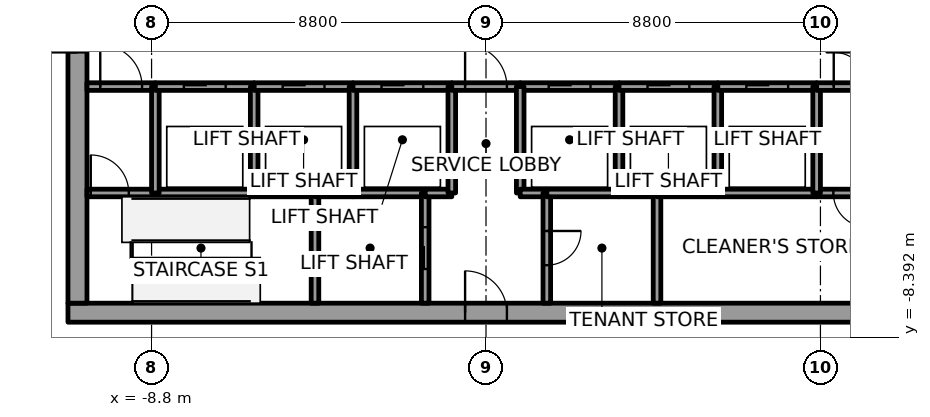
"""IFC4 building model, lengths in metres.
Left out: names, types, materials, properties, quantities, classifications, styles, units other than length and angle.
Written with IfcOpenShell. Run it as: python <this file> out.ifc"""

import sys

from ifc_helpers import new_model, si_unit, direction, frame, frame_2d, origin, place, context, subcontext, project, spatial, rectangle, extrude, element, fill, save


model = new_model("IFC4")
c1 = context("Model", 3, precision=1e-05, world=origin(), true_north=direction((0.0, 1.0)))
c2 = subcontext(c1, "Body", "Model", "MODEL_VIEW")
j1 = project(units=[si_unit("LENGTHUNIT", "METRE"), si_unit("PLANEANGLEUNIT", "RADIAN")], contexts=[c1])
p1 = place(None, origin())
s1 = spatial("IfcSite", under=j1, at=p1, CompositionType="ELEMENT")
p2 = place(p1, origin())
s2 = spatial("IfcBuilding", under=s1, at=p2, CompositionType="ELEMENT")
p3 = place(p2, frame((0.0, 0.0, 145.8)))
s3 = spatial("IfcBuildingStorey", under=s2, at=p3, CompositionType="ELEMENT", Elevation=145.8)
p4 = place(p3, frame((-11.0, -7.75, 0.0), z_axis=(0.0, 0.0, 1.0), x_axis=(1.0, 0.0, 0.0)))
e1 = element("IfcWall", 1, at=p4, inside=s3, PredefinedType="SHEAR", context=c2, shape_type="SweptSolid", body=[
    extrude(rectangle(XDim=22.0, YDim=0.5, at=frame_2d((11.0, 0.0))), origin(), (0.0, 0.0, 1.0), 4.0),
])
p5 = place(p4, frame((10.45, 0.0, 0.0)))
e2 = element("IfcOpeningElement", 2, at=p5, cuts=e1, PredefinedType="OPENING", context=c2, shape_type="SweptSolid", body=[
    extrude(rectangle(XDim=1.1, YDim=2.1, at=frame_2d((0.55, 1.05))), frame((0.0, 0.25, 0.0), z_axis=(0.0, -1.0, 0.0), x_axis=(1.0, 0.0, 0.0)), (0.0, 0.0, 1.0), 0.5),
])
p6 = place(p3, frame((-10.75, -7.5, 0.0), z_axis=(0.0, 0.0, 1.0), x_axis=(0.0, 1.0, 0.0)))
e3 = element("IfcWall", 3, at=p6, inside=s3, PredefinedType="SHEAR", context=c2, shape_type="SweptSolid", body=[
    extrude(rectangle(XDim=15.0, YDim=0.5, at=frame_2d((7.5, 0.0))), origin(), (0.0, 0.0, 1.0), 4.0),
])
p7 = place(p6, frame((6.6, 0.0, 0.0)))
e4 = element("IfcOpeningElement", 4, at=p7, cuts=e3, PredefinedType="OPENING", context=c2, shape_type="SweptSolid", body=[
    extrude(rectangle(XDim=1.8, YDim=2.1, at=frame_2d((0.9, 1.05))), frame((0.0, 0.25, 0.0), z_axis=(0.0, -1.0, 0.0), x_axis=(1.0, 0.0, 0.0)), (0.0, 0.0, 1.0), 0.5),
])
p8 = place(p3, frame((-10.5, -4.6, 0.0), z_axis=(0.0, 0.0, 1.0), x_axis=(1.0, 0.0, 0.0)))
e5 = element("IfcWall", 5, at=p8, inside=s3, PredefinedType="SOLIDWALL", context=c2, shape_type="SweptSolid", body=[
    extrude(rectangle(XDim=1.8, YDim=0.2, at=frame_2d((0.9, 0.0))), origin(), (0.0, 0.0, 1.0), 3.85),
])
p9 = place(p8, frame((0.1, 0.0, 0.0)))
e6 = element("IfcOpeningElement", 6, at=p9, cuts=e5, PredefinedType="OPENING", context=c2, shape_type="SweptSolid", body=[
    extrude(rectangle(XDim=1.0, YDim=2.1, at=frame_2d((0.5, 1.05))), frame((0.0, 0.1, 0.0), z_axis=(0.0, -1.0, 0.0), x_axis=(1.0, 0.0, 0.0)), (0.0, 0.0, 1.0), 0.2),
])
p10 = place(p3, frame((-10.5, -1.8, 0.0), z_axis=(0.0, 0.0, 1.0), x_axis=(1.0, 0.0, 0.0)))
e7 = element("IfcWall", 7, at=p10, inside=s3, PredefinedType="SOLIDWALL", context=c2, shape_type="SweptSolid", body=[
    extrude(rectangle(XDim=1.8, YDim=0.2, at=frame_2d((0.9, 0.0))), origin(), (0.0, 0.0, 1.0), 3.85),
])
p11 = place(p10, frame((0.35, 0.0, 0.0)))
e8 = element("IfcOpeningElement", 8, at=p11, cuts=e7, PredefinedType="OPENING", context=c2, shape_type="SweptSolid", body=[
    extrude(rectangle(XDim=1.1, YDim=2.1, at=frame_2d((0.55, 1.05))), frame((0.0, 0.1, 0.0), z_axis=(0.0, -1.0, 0.0), x_axis=(1.0, 0.0, 0.0)), (0.0, 0.0, 1.0), 0.2),
])
p12 = place(p3, frame((-8.7, -4.6, 0.0), z_axis=(0.0, 0.0, 1.0), x_axis=(1.0, 0.0, 0.0)))
e9 = element("IfcWall", 9, at=p12, inside=s3, PredefinedType="SOLIDWALL", context=c2, shape_type="SweptSolid", body=[
    extrude(rectangle(XDim=2.6, YDim=0.2, at=frame_2d((1.3, 0.0))), origin(), (0.0, 0.0, 1.0), 3.85),
])
p13 = place(p3, frame((-8.7, -4.6, 0.0), z_axis=(0.0, 0.0, 1.0), x_axis=(0.0, 1.0, 0.0)))
e10 = element("IfcWall", 10, at=p13, inside=s3, PredefinedType="SOLIDWALL", context=c2, shape_type="SweptSolid", body=[
    extrude(rectangle(XDim=2.8, YDim=0.2, at=frame_2d((1.4, 0.0))), origin(), (0.0, 0.0, 1.0), 3.85),
])
p14 = place(p3, frame((-8.7, -1.8, 0.0), z_axis=(0.0, 0.0, 1.0), x_axis=(1.0, 0.0, 0.0)))
e11 = element("IfcWall", 11, at=p14, inside=s3, PredefinedType="SOLIDWALL", context=c2, shape_type="SweptSolid", body=[
    extrude(rectangle(XDim=2.6, YDim=0.2, at=frame_2d((1.3, 0.0))), origin(), (0.0, 0.0, 1.0), 3.85),
])
p15 = place(p14, frame((0.75, 0.0, 0.0)))
e12 = element("IfcOpeningElement", 12, at=p15, cuts=e11, PredefinedType="OPENING", context=c2, shape_type="SweptSolid", body=[
    extrude(rectangle(XDim=1.1, YDim=2.1, at=frame_2d((0.55, 1.05))), frame((0.0, 0.1, 0.0), z_axis=(0.0, -1.0, 0.0), x_axis=(1.0, 0.0, 0.0)), (0.0, 0.0, 1.0), 0.2),
])
p16 = place(p3, frame((-6.1, -4.6, 0.0), z_axis=(0.0, 0.0, 1.0), x_axis=(1.0, 0.0, 0.0)))
e13 = element("IfcWall", 13, at=p16, inside=s3, PredefinedType="SOLIDWALL", context=c2, shape_type="SweptSolid", body=[
    extrude(rectangle(XDim=1.6, YDim=0.2, at=frame_2d((0.8, 0.0))), origin(), (0.0, 0.0, 1.0), 3.85),
])
p17 = place(p3, frame((-6.1, -4.6, 0.0), z_axis=(0.0, 0.0, 1.0), x_axis=(0.0, 1.0, 0.0)))
e14 = element("IfcWall", 14, at=p17, inside=s3, PredefinedType="SOLIDWALL", context=c2, shape_type="SweptSolid", body=[
    extrude(rectangle(XDim=2.8, YDim=0.2, at=frame_2d((1.4, 0.0))), origin(), (0.0, 0.0, 1.0), 3.85),
])
p18 = place(p3, frame((-6.1, -1.8, 0.0), z_axis=(0.0, 0.0, 1.0), x_axis=(1.0, 0.0, 0.0)))
e15 = element("IfcWall", 15, at=p18, inside=s3, PredefinedType="SOLIDWALL", context=c2, shape_type="SweptSolid", body=[
    extrude(rectangle(XDim=2.6, YDim=0.2, at=frame_2d((1.3, 0.0))), origin(), (0.0, 0.0, 1.0), 3.85),
])
p19 = place(p18, frame((0.75, 0.0, 0.0)))
e16 = element("IfcOpeningElement", 16, at=p19, cuts=e15, PredefinedType="OPENING", context=c2, shape_type="SweptSolid", body=[
    extrude(rectangle(XDim=1.1, YDim=2.1, at=frame_2d((0.55, 1.05))), frame((0.0, 0.1, 0.0), z_axis=(0.0, -1.0, 0.0), x_axis=(1.0, 0.0, 0.0)), (0.0, 0.0, 1.0), 0.2),
])
p20 = place(p3, frame((-4.5, -4.6, 0.0), z_axis=(0.0, 0.0, 1.0), x_axis=(0.0, -1.0, 0.0)))
e17 = element("IfcWall", 17, at=p20, inside=s3, PredefinedType="SOLIDWALL", context=c2, shape_type="SweptSolid", body=[
    extrude(rectangle(XDim=2.9, YDim=0.2, at=frame_2d((1.45, 0.0))), origin(), (0.0, 0.0, 1.0), 3.85),
])
p21 = place(p3, frame((-4.5, -4.6, 0.0), z_axis=(0.0, 0.0, 1.0), x_axis=(1.0, 0.0, 0.0)))
e18 = element("IfcWall", 18, at=p21, inside=s3, PredefinedType="SOLIDWALL", context=c2, shape_type="SweptSolid", body=[
    extrude(rectangle(XDim=1.0, YDim=0.2, at=frame_2d((0.5, 0.0))), origin(), (0.0, 0.0, 1.0), 3.85),
])
p22 = place(p3, frame((-3.5, -4.6, 0.0), z_axis=(0.0, 0.0, 1.0), x_axis=(1.0, 0.0, 0.0)))
e19 = element("IfcWall", 19, at=p22, inside=s3, PredefinedType="SOLIDWALL", context=c2, shape_type="SweptSolid", body=[
    extrude(rectangle(XDim=1.9, YDim=0.2, at=frame_2d((0.95, 0.0))), origin(), (0.0, 0.0, 1.0), 3.85),
])
p23 = place(p3, frame((-3.5, -4.6, 0.0), z_axis=(0.0, 0.0, 1.0), x_axis=(0.0, 1.0, 0.0)))
e20 = element("IfcWall", 20, at=p23, inside=s3, PredefinedType="SOLIDWALL", context=c2, shape_type="SweptSolid", body=[
    extrude(rectangle(XDim=2.8, YDim=0.2, at=frame_2d((1.4, 0.0))), origin(), (0.0, 0.0, 1.0), 3.85),
])
p24 = place(p3, frame((-3.5, -1.8, 0.0), z_axis=(0.0, 0.0, 1.0), x_axis=(1.0, 0.0, 0.0)))
e21 = element("IfcWall", 21, at=p24, inside=s3, PredefinedType="SOLIDWALL", context=c2, shape_type="SweptSolid", body=[
    extrude(rectangle(XDim=2.6, YDim=0.2, at=frame_2d((1.3, 0.0))), origin(), (0.0, 0.0, 1.0), 3.85),
])
p25 = place(p24, frame((0.75, 0.0, 0.0)))
e22 = element("IfcOpeningElement", 22, at=p25, cuts=e21, PredefinedType="OPENING", context=c2, shape_type="SweptSolid", body=[
    extrude(rectangle(XDim=1.1, YDim=2.1, at=frame_2d((0.55, 1.05))), frame((0.0, 0.1, 0.0), z_axis=(0.0, -1.0, 0.0), x_axis=(1.0, 0.0, 0.0)), (0.0, 0.0, 1.0), 0.2),
])
p26 = place(p3, frame((-1.6, -7.5, 0.0), z_axis=(0.0, 0.0, 1.0), x_axis=(0.0, 1.0, 0.0)))
e23 = element("IfcWall", 23, at=p26, inside=s3, PredefinedType="SOLIDWALL", context=c2, shape_type="SweptSolid", body=[
    extrude(rectangle(XDim=2.9, YDim=0.2, at=frame_2d((1.45, 0.0))), origin(), (0.0, 0.0, 1.0), 3.85),
])
p27 = place(p26, frame((0.9, 0.0, 0.0)))
e24 = element("IfcOpeningElement", 24, at=p27, cuts=e23, PredefinedType="OPENING", context=c2, shape_type="SweptSolid", body=[
    extrude(rectangle(XDim=1.1, YDim=2.1, at=frame_2d((0.55, 1.05))), frame((0.0, 0.1, 0.0), z_axis=(0.0, -1.0, 0.0), x_axis=(1.0, 0.0, 0.0)), (0.0, 0.0, 1.0), 0.2),
])
p28 = place(p3, frame((-1.6, -4.6, 0.0), z_axis=(0.0, 0.0, 1.0), x_axis=(1.0, 0.0, 0.0)))
e25 = element("IfcWall", 25, at=p28, inside=s3, PredefinedType="SOLIDWALL", context=c2, shape_type="SweptSolid", body=[
    extrude(rectangle(XDim=0.7, YDim=0.2, at=frame_2d((0.35, 0.0))), origin(), (0.0, 0.0, 1.0), 3.85),
])
p29 = place(p3, frame((-0.9, -4.6, 0.0), z_axis=(0.0, 0.0, 1.0), x_axis=(0.0, 1.0, 0.0)))
e26 = element("IfcWall", 26, at=p29, inside=s3, PredefinedType="SOLIDWALL", context=c2, shape_type="SweptSolid", body=[
    extrude(rectangle(XDim=2.8, YDim=0.2, at=frame_2d((1.4, 0.0))), origin(), (0.0, 0.0, 1.0), 3.85),
])
p30 = place(p3, frame((-0.9, -1.8, 0.0), z_axis=(0.0, 0.0, 1.0), x_axis=(1.0, 0.0, 0.0)))
e27 = element("IfcWall", 27, at=p30, inside=s3, PredefinedType="SOLIDWALL", context=c2, shape_type="SweptSolid", body=[
    extrude(rectangle(XDim=1.8, YDim=0.2, at=frame_2d((0.9, 0.0))), origin(), (0.0, 0.0, 1.0), 3.85),
])
p31 = place(p30, frame((0.35, 0.0, 0.0)))
e28 = element("IfcOpeningElement", 28, at=p31, cuts=e27, PredefinedType="OPENING", context=c2, shape_type="SweptSolid", body=[
    extrude(rectangle(XDim=1.1, YDim=2.1, at=frame_2d((0.55, 1.05))), frame((0.0, 0.1, 0.0), z_axis=(0.0, -1.0, 0.0), x_axis=(1.0, 0.0, 0.0)), (0.0, 0.0, 1.0), 0.2),
])
p32 = place(p3, frame((0.9, -1.8, 0.0), z_axis=(0.0, 0.0, 1.0), x_axis=(1.0, 0.0, 0.0)))
e29 = element("IfcWall", 29, at=p32, inside=s3, PredefinedType="SOLIDWALL", context=c2, shape_type="SweptSolid", body=[
    extrude(rectangle(XDim=2.6, YDim=0.2, at=frame_2d((1.3, 0.0))), origin(), (0.0, 0.0, 1.0), 3.85),
])
p33 = place(p32, frame((0.75, 0.0, 0.0)))
e30 = element("IfcOpeningElement", 30, at=p33, cuts=e29, PredefinedType="OPENING", context=c2, shape_type="SweptSolid", body=[
    extrude(rectangle(XDim=1.1, YDim=2.1, at=frame_2d((0.55, 1.05))), frame((0.0, 0.1, 0.0), z_axis=(0.0, -1.0, 0.0), x_axis=(1.0, 0.0, 0.0)), (0.0, 0.0, 1.0), 0.2),
])
p34 = place(p3, frame((0.9, -1.8, 0.0), z_axis=(0.0, 0.0, 1.0), x_axis=(0.0, -1.0, 0.0)))
e31 = element("IfcWall", 31, at=p34, inside=s3, PredefinedType="SOLIDWALL", context=c2, shape_type="SweptSolid", body=[
    extrude(rectangle(XDim=2.8, YDim=0.2, at=frame_2d((1.4, 0.0))), origin(), (0.0, 0.0, 1.0), 3.85),
])
p35 = place(p3, frame((0.9, -4.6, 0.0), z_axis=(0.0, 0.0, 1.0), x_axis=(1.0, 0.0, 0.0)))
e32 = element("IfcWall", 32, at=p35, inside=s3, PredefinedType="SOLIDWALL", context=c2, shape_type="SweptSolid", body=[
    extrude(rectangle(XDim=0.7, YDim=0.2, at=frame_2d((0.35, 0.0))), origin(), (0.0, 0.0, 1.0), 3.85),
])
p36 = place(p3, frame((1.6, -4.6, 0.0), z_axis=(0.0, 0.0, 1.0), x_axis=(0.0, -1.0, 0.0)))
e33 = element("IfcWall", 33, at=p36, inside=s3, PredefinedType="SOLIDWALL", context=c2, shape_type="SweptSolid", body=[
    extrude(rectangle(XDim=2.9, YDim=0.2, at=frame_2d((1.45, 0.0))), origin(), (0.0, 0.0, 1.0), 3.85),
])
p37 = place(p36, frame((1.0, 0.0, 0.0)))
e34 = element("IfcOpeningElement", 34, at=p37, cuts=e33, PredefinedType="OPENING", context=c2, shape_type="SweptSolid", body=[
    extrude(rectangle(XDim=0.9, YDim=2.1, at=frame_2d((0.45, 1.05))), frame((0.0, 0.1, 0.0), z_axis=(0.0, -1.0, 0.0), x_axis=(1.0, 0.0, 0.0)), (0.0, 0.0, 1.0), 0.2),
])
p38 = place(p3, frame((3.5, -4.6, 0.0), z_axis=(0.0, 0.0, 1.0), x_axis=(-1.0, 0.0, 0.0)))
e35 = element("IfcWall", 35, at=p38, inside=s3, PredefinedType="SOLIDWALL", context=c2, shape_type="SweptSolid", body=[
    extrude(rectangle(XDim=1.9, YDim=0.2, at=frame_2d((0.95, 0.0))), origin(), (0.0, 0.0, 1.0), 3.85),
])
p39 = place(p3, frame((4.5, -4.6, 0.0), z_axis=(0.0, 0.0, 1.0), x_axis=(-1.0, 0.0, 0.0)))
e36 = element("IfcWall", 36, at=p39, inside=s3, PredefinedType="SOLIDWALL", context=c2, shape_type="SweptSolid", body=[
    extrude(rectangle(XDim=1.0, YDim=0.2, at=frame_2d((0.5, 0.0))), origin(), (0.0, 0.0, 1.0), 3.85),
])
p40 = place(p3, frame((3.5, -4.6, 0.0), z_axis=(0.0, 0.0, 1.0), x_axis=(0.0, 1.0, 0.0)))
e37 = element("IfcWall", 37, at=p40, inside=s3, PredefinedType="SOLIDWALL", context=c2, shape_type="SweptSolid", body=[
    extrude(rectangle(XDim=2.8, YDim=0.2, at=frame_2d((1.4, 0.0))), origin(), (0.0, 0.0, 1.0), 3.85),
])
p41 = place(p3, frame((3.5, -1.8, 0.0), z_axis=(0.0, 0.0, 1.0), x_axis=(1.0, 0.0, 0.0)))
e38 = element("IfcWall", 38, at=p41, inside=s3, PredefinedType="SOLIDWALL", context=c2, shape_type="SweptSolid", body=[
    extrude(rectangle(XDim=2.6, YDim=0.2, at=frame_2d((1.3, 0.0))), origin(), (0.0, 0.0, 1.0), 3.85),
])
p42 = place(p41, frame((0.75, 0.0, 0.0)))
e39 = element("IfcOpeningElement", 39, at=p42, cuts=e38, PredefinedType="OPENING", context=c2, shape_type="SweptSolid", body=[
    extrude(rectangle(XDim=1.1, YDim=2.1, at=frame_2d((0.55, 1.05))), frame((0.0, 0.1, 0.0), z_axis=(0.0, -1.0, 0.0), x_axis=(1.0, 0.0, 0.0)), (0.0, 0.0, 1.0), 0.2),
])
p43 = place(p3, frame((4.5, -4.6, 0.0), z_axis=(0.0, 0.0, 1.0), x_axis=(0.0, -1.0, 0.0)))
e40 = element("IfcWall", 40, at=p43, inside=s3, PredefinedType="SOLIDWALL", context=c2, shape_type="SweptSolid", body=[
    extrude(rectangle(XDim=2.9, YDim=0.2, at=frame_2d((1.45, 0.0))), origin(), (0.0, 0.0, 1.0), 3.85),
])
p44 = place(p3, frame((6.1, -4.6, 0.0), z_axis=(0.0, 0.0, 1.0), x_axis=(-1.0, 0.0, 0.0)))
e41 = element("IfcWall", 41, at=p44, inside=s3, PredefinedType="SOLIDWALL", context=c2, shape_type="SweptSolid", body=[
    extrude(rectangle(XDim=1.6, YDim=0.2, at=frame_2d((0.8, 0.0))), origin(), (0.0, 0.0, 1.0), 3.85),
])
p45 = place(p3, frame((8.7, -4.6, 0.0), z_axis=(0.0, 0.0, 1.0), x_axis=(-1.0, 0.0, 0.0)))
e42 = element("IfcWall", 42, at=p45, inside=s3, PredefinedType="SOLIDWALL", context=c2, shape_type="SweptSolid", body=[
    extrude(rectangle(XDim=2.6, YDim=0.2, at=frame_2d((1.3, 0.0))), origin(), (0.0, 0.0, 1.0), 3.85),
])
p46 = place(p3, frame((6.1, -4.6, 0.0), z_axis=(0.0, 0.0, 1.0), x_axis=(0.0, 1.0, 0.0)))
e43 = element("IfcWall", 43, at=p46, inside=s3, PredefinedType="SOLIDWALL", context=c2, shape_type="SweptSolid", body=[
    extrude(rectangle(XDim=2.8, YDim=0.2, at=frame_2d((1.4, 0.0))), origin(), (0.0, 0.0, 1.0), 3.85),
])
p47 = place(p3, frame((6.1, -1.8, 0.0), z_axis=(0.0, 0.0, 1.0), x_axis=(1.0, 0.0, 0.0)))
e44 = element("IfcWall", 44, at=p47, inside=s3, PredefinedType="SOLIDWALL", context=c2, shape_type="SweptSolid", body=[
    extrude(rectangle(XDim=2.6, YDim=0.2, at=frame_2d((1.3, 0.0))), origin(), (0.0, 0.0, 1.0), 3.85),
])
p48 = place(p47, frame((0.75, 0.0, 0.0)))
e45 = element("IfcOpeningElement", 45, at=p48, cuts=e44, PredefinedType="OPENING", context=c2, shape_type="SweptSolid", body=[
    extrude(rectangle(XDim=1.1, YDim=2.1, at=frame_2d((0.55, 1.05))), frame((0.0, 0.1, 0.0), z_axis=(0.0, -1.0, 0.0), x_axis=(1.0, 0.0, 0.0)), (0.0, 0.0, 1.0), 0.2),
])
p49 = place(p3, frame((10.5, -4.6, 0.0), z_axis=(0.0, 0.0, 1.0), x_axis=(-1.0, 0.0, 0.0)))
e46 = element("IfcWall", 46, at=p49, inside=s3, PredefinedType="SOLIDWALL", context=c2, shape_type="SweptSolid", body=[
    extrude(rectangle(XDim=1.8, YDim=0.2, at=frame_2d((0.9, 0.0))), origin(), (0.0, 0.0, 1.0), 3.85),
])
p50 = place(p49, frame((0.46, 0.0, 0.0)))
e47 = element("IfcOpeningElement", 47, at=p50, cuts=e46, PredefinedType="OPENING", context=c2, shape_type="SweptSolid", body=[
    extrude(rectangle(XDim=0.9, YDim=2.1, at=frame_2d((0.45, 1.05))), frame((0.0, 0.1, 0.0), z_axis=(0.0, -1.0, 0.0), x_axis=(1.0, 0.0, 0.0)), (0.0, 0.0, 1.0), 0.2),
])
p51 = place(p3, frame((8.7, -1.8, 0.0), z_axis=(0.0, 0.0, 1.0), x_axis=(0.0, -1.0, 0.0)))
e48 = element("IfcWall", 48, at=p51, inside=s3, PredefinedType="SOLIDWALL", context=c2, shape_type="SweptSolid", body=[
    extrude(rectangle(XDim=2.8, YDim=0.2, at=frame_2d((1.4, 0.0))), origin(), (0.0, 0.0, 1.0), 3.85),
])
p52 = place(p3, frame((8.7, -1.8, 0.0), z_axis=(0.0, 0.0, 1.0), x_axis=(1.0, 0.0, 0.0)))
e49 = element("IfcWall", 49, at=p52, inside=s3, PredefinedType="SOLIDWALL", context=c2, shape_type="SweptSolid", body=[
    extrude(rectangle(XDim=1.8, YDim=0.2, at=frame_2d((0.9, 0.0))), origin(), (0.0, 0.0, 1.0), 3.85),
])
p53 = place(p52, frame((0.45, 0.0, 0.0)))
e50 = element("IfcOpeningElement", 50, at=p53, cuts=e49, PredefinedType="OPENING", context=c2, shape_type="SweptSolid", body=[
    extrude(rectangle(XDim=0.9, YDim=2.1, at=frame_2d((0.45, 1.05))), frame((0.0, 0.1, 0.0), z_axis=(0.0, -1.0, 0.0), x_axis=(1.0, 0.0, 0.0)), (0.0, 0.0, 1.0), 0.2),
])
p54 = place(p15, origin())
e51 = element("IfcDoor", 51, at=p54, inside=s3, OperationType="SLIDING_TO_LEFT", PredefinedType="DOOR", context=c2, shape_type="SweptSolid", body=[
    extrude(rectangle(XDim=1.1, YDim=2.1, at=frame_2d((0.55, 1.05))), frame((0.0, 0.025, 0.0), z_axis=(0.0, -1.0, 0.0), x_axis=(1.0, 0.0, 0.0)), (0.0, 0.0, 1.0), 0.05),
])
fill(e12, e51)
p55 = place(p19, origin())
e52 = element("IfcDoor", 52, at=p55, inside=s3, OperationType="SLIDING_TO_LEFT", PredefinedType="DOOR", context=c2, shape_type="SweptSolid", body=[
    extrude(rectangle(XDim=1.1, YDim=2.1, at=frame_2d((0.55, 1.05))), frame((0.0, 0.025, 0.0), z_axis=(0.0, -1.0, 0.0), x_axis=(1.0, 0.0, 0.0)), (0.0, 0.0, 1.0), 0.05),
])
fill(e16, e52)
p56 = place(p25, origin())
e53 = element("IfcDoor", 53, at=p56, inside=s3, OperationType="SLIDING_TO_RIGHT", PredefinedType="DOOR", context=c2, shape_type="SweptSolid", body=[
    extrude(rectangle(XDim=1.1, YDim=2.1, at=frame_2d((0.55, 1.05))), frame((0.0, 0.025, 0.0), z_axis=(0.0, -1.0, 0.0), x_axis=(1.0, 0.0, 0.0)), (0.0, 0.0, 1.0), 0.05),
])
fill(e22, e53)
p57 = place(p33, origin())
e54 = element("IfcDoor", 54, at=p57, inside=s3, OperationType="SLIDING_TO_LEFT", PredefinedType="DOOR", context=c2, shape_type="SweptSolid", body=[
    extrude(rectangle(XDim=1.1, YDim=2.1, at=frame_2d((0.55, 1.05))), frame((0.0, 0.025, 0.0), z_axis=(0.0, -1.0, 0.0), x_axis=(1.0, 0.0, 0.0)), (0.0, 0.0, 1.0), 0.05),
])
fill(e30, e54)
p58 = place(p42, origin())
e55 = element("IfcDoor", 55, at=p58, inside=s3, OperationType="SLIDING_TO_RIGHT", PredefinedType="DOOR", context=c2, shape_type="SweptSolid", body=[
    extrude(rectangle(XDim=1.1, YDim=2.1, at=frame_2d((0.55, 1.05))), frame((0.0, 0.025, 0.0), z_axis=(0.0, -1.0, 0.0), x_axis=(1.0, 0.0, 0.0)), (0.0, 0.0, 1.0), 0.05),
])
fill(e39, e55)
p59 = place(p48, origin())
e56 = element("IfcDoor", 56, at=p59, inside=s3, OperationType="SLIDING_TO_RIGHT", PredefinedType="DOOR", context=c2, shape_type="SweptSolid", body=[
    extrude(rectangle(XDim=1.1, YDim=2.1, at=frame_2d((0.55, 1.05))), frame((0.0, 0.025, 0.0), z_axis=(0.0, -1.0, 0.0), x_axis=(1.0, 0.0, 0.0)), (0.0, 0.0, 1.0), 0.05),
])
fill(e45, e56)
p60 = place(p27, origin())
e57 = element("IfcDoor", 57, at=p60, inside=s3, OperationType="SLIDING_TO_LEFT", PredefinedType="DOOR", context=c2, shape_type="SweptSolid", body=[
    extrude(rectangle(XDim=1.1, YDim=2.1, at=frame_2d((0.55, 1.05))), frame((0.0, 0.025, 0.0), z_axis=(0.0, -1.0, 0.0), x_axis=(1.0, 0.0, 0.0)), (0.0, 0.0, 1.0), 0.05),
])
fill(e24, e57)
p61 = place(p11, origin())
e58 = element("IfcDoor", 58, at=p61, inside=s3, OperationType="SINGLE_SWING_RIGHT", PredefinedType="DOOR", context=c2, shape_type="SweptSolid", body=[
    extrude(rectangle(XDim=1.1, YDim=2.1, at=frame_2d((0.55, 1.05))), frame((0.0, 0.025, 0.0), z_axis=(0.0, -1.0, 0.0), x_axis=(1.0, 0.0, 0.0)), (0.0, 0.0, 1.0), 0.05),
])
fill(e8, e58)
p62 = place(p31, origin())
e59 = element("IfcDoor", 59, at=p62, inside=s3, OperationType="SINGLE_SWING_LEFT", PredefinedType="DOOR", context=c2, shape_type="SweptSolid", body=[
    extrude(rectangle(XDim=1.1, YDim=2.1, at=frame_2d((0.55, 1.05))), frame((0.0, 0.025, 0.0), z_axis=(0.0, -1.0, 0.0), x_axis=(1.0, 0.0, 0.0)), (0.0, 0.0, 1.0), 0.05),
])
fill(e28, e59)
p63 = place(p9, origin())
e60 = element("IfcDoor", 60, at=p63, inside=s3, OperationType="SINGLE_SWING_LEFT", PredefinedType="DOOR", context=c2, shape_type="SweptSolid", body=[
    extrude(rectangle(XDim=1.0, YDim=2.1, at=frame_2d((0.5, 1.05))), frame((0.0, 0.025, 0.0), z_axis=(0.0, -1.0, 0.0), x_axis=(1.0, 0.0, 0.0)), (0.0, 0.0, 1.0), 0.05),
])
fill(e6, e60)
p64 = place(p50, origin())
e61 = element("IfcDoor", 61, at=p64, inside=s3, OperationType="SINGLE_SWING_LEFT", PredefinedType="DOOR", context=c2, shape_type="SweptSolid", body=[
    extrude(rectangle(XDim=0.9, YDim=2.1, at=frame_2d((0.45, 1.05))), frame((0.0, 0.025, 0.0), z_axis=(0.0, -1.0, 0.0), x_axis=(1.0, 0.0, 0.0)), (0.0, 0.0, 1.0), 0.05),
])
fill(e47, e61)
p65 = place(p53, origin())
e62 = element("IfcDoor", 62, at=p65, inside=s3, OperationType="SINGLE_SWING_RIGHT", PredefinedType="DOOR", context=c2, shape_type="SweptSolid", body=[
    extrude(rectangle(XDim=0.9, YDim=2.1, at=frame_2d((0.45, 1.05))), frame((0.0, 0.025, 0.0), z_axis=(0.0, -1.0, 0.0), x_axis=(1.0, 0.0, 0.0)), (0.0, 0.0, 1.0), 0.05),
])
fill(e50, e62)
p66 = place(p37, origin())
e63 = element("IfcDoor", 63, at=p66, inside=s3, OperationType="SINGLE_SWING_LEFT", PredefinedType="DOOR", context=c2, shape_type="SweptSolid", body=[
    extrude(rectangle(XDim=0.9, YDim=2.1, at=frame_2d((0.45, 1.05))), frame((0.0, 0.025, 0.0), z_axis=(0.0, -1.0, 0.0), x_axis=(1.0, 0.0, 0.0)), (0.0, 0.0, 1.0), 0.05),
])
fill(e34, e63)
p67 = place(p7, origin())
e64 = element("IfcDoor", 64, at=p67, inside=s3, OperationType="DOUBLE_DOOR_SINGLE_SWING", PredefinedType="DOOR", context=c2, shape_type="SweptSolid", body=[
    extrude(rectangle(XDim=1.8, YDim=2.1, at=frame_2d((0.9, 1.05))), frame((0.0, 0.025, 0.0), z_axis=(0.0, -1.0, 0.0), x_axis=(1.0, 0.0, 0.0)), (0.0, 0.0, 1.0), 0.05),
])
fill(e4, e64)
p68 = place(p5, origin())
e65 = element("IfcDoor", 65, at=p68, inside=s3, OperationType="SINGLE_SWING_LEFT", PredefinedType="DOOR", context=c2, shape_type="SweptSolid", body=[
    extrude(rectangle(XDim=1.1, YDim=2.1, at=frame_2d((0.55, 1.05))), frame((0.0, 0.025, 0.0), z_axis=(0.0, -1.0, 0.0), x_axis=(1.0, 0.0, 0.0)), (0.0, 0.0, 1.0), 0.05),
])
fill(e2, e65)
save(model, sys.argv[1])
